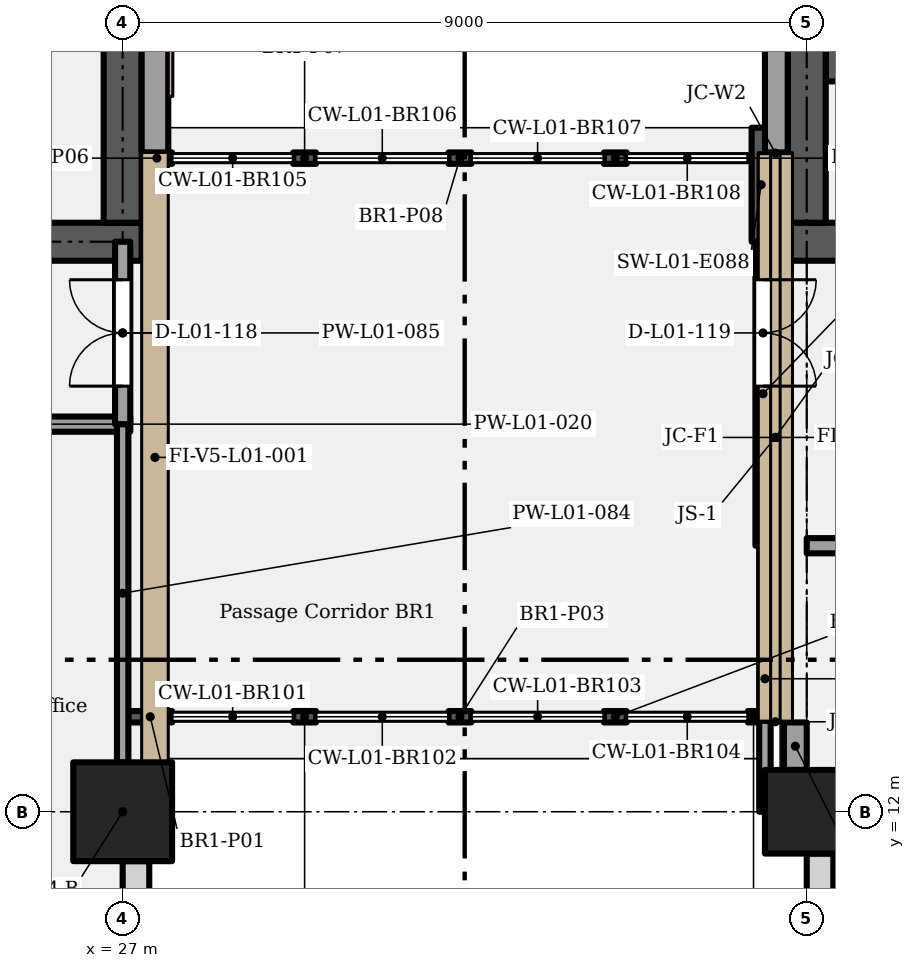
"""IFC4 building model, lengths in metres.
Left out: names, types, materials, properties, quantities, classifications, styles, units other than length and angle.
Written with IfcOpenShell. Run it as: python <this file> out.ifc"""

import sys

from ifc_helpers import new_model, si_unit, direction, frame, frame_2d, origin, origin_2d, place, context, subcontext, project, spatial, rectangle, extrude, element, fill, save


model = new_model("IFC4")
c1 = context("Model", 3, precision=1e-05, world=origin(), true_north=direction((0.0, 1.0)))
c2 = subcontext(c1, "Body", "Model", "MODEL_VIEW")
j1 = project(units=[si_unit("LENGTHUNIT", "METRE"), si_unit("PLANEANGLEUNIT", "RADIAN")], contexts=[c1])
p1 = place(None, origin())
s1 = spatial("IfcSite", under=j1, at=p1, CompositionType="ELEMENT")
p2 = place(p1, origin())
s2 = spatial("IfcBuilding", under=s1, at=p2, CompositionType="ELEMENT")
p3 = place(p2, frame((0.0, 0.0, 6.6)))
s3 = spatial("IfcBuildingStorey", under=s2, at=p3, CompositionType="ELEMENT", Elevation=6.6)
p4 = place(p3, frame((27.0, 12.0, 0.0), z_axis=(0.0, 0.0, 1.0), x_axis=(1.0, 0.0, 0.0)))
e1 = element("IfcColumn", 1, at=p4, inside=s3, PredefinedType="COLUMN", context=c2, shape_type="SweptSolid", body=[
    extrude(rectangle(XDim=1.3, YDim=1.3, at=origin_2d()), origin(), (0.0, 0.0, 1.0), 5.4),
])
p5 = place(p3, frame((36.0, 12.0, 0.0), z_axis=(0.0, 0.0, 1.0), x_axis=(1.0, 0.0, 0.0)))
e2 = element("IfcColumn", 2, at=p5, inside=s3, PredefinedType="COLUMN", context=c2, shape_type="SweptSolid", body=[
    extrude(rectangle(XDim=1.1, YDim=1.1, at=origin_2d()), origin(), (0.0, 0.0, 1.0), 5.4),
])
p6 = place(p3, frame((17.75, 19.5, 0.0), z_axis=(0.0, 0.0, 1.0), x_axis=(1.0, 0.0, 0.0)))
e3 = element("IfcWall", 3, at=p6, inside=s3, PredefinedType="SHEAR", context=c2, shape_type="SweptSolid", body=[
    extrude(rectangle(XDim=9.5, YDim=0.5, at=frame_2d((4.75, 0.0))), origin(), (0.0, 0.0, 1.0), 5.1),
])
p7 = place(p6, frame((1.9, 0.0, 0.0)))
e4 = element("IfcOpeningElement", 4, at=p7, cuts=e3, PredefinedType="OPENING", context=c2, shape_type="SweptSolid", body=[
    extrude(rectangle(XDim=1.2, YDim=2.1, at=frame_2d((0.6, 1.05))), frame((0.0, 0.26, 0.0), z_axis=(0.0, -1.0, 0.0), x_axis=(1.0, 0.0, 0.0)), (0.0, 0.0, 1.0), 0.52),
])
p8 = place(p6, frame((7.95, 0.0, 0.0), z_axis=(0.0, 0.0, 1.0), x_axis=(-1.0, 0.0, 0.0)))
e5 = element("IfcOpeningElement", 5, at=p8, cuts=e3, PredefinedType="OPENING", context=c2, shape_type="SweptSolid", body=[
    extrude(rectangle(XDim=1.8, YDim=2.1, at=frame_2d((0.9, 1.05))), frame((0.0, 0.26, 0.0), z_axis=(0.0, -1.0, 0.0), x_axis=(1.0, 0.0, 0.0)), (0.0, 0.0, 1.0), 0.52),
])
p9 = place(p3, frame((35.75, 19.5, 0.0), z_axis=(0.0, 0.0, 1.0), x_axis=(1.0, 0.0, 0.0)))
e6 = element("IfcWall", 6, at=p9, inside=s3, PredefinedType="SHEAR", context=c2, shape_type="SweptSolid", body=[
    extrude(rectangle(XDim=5.0, YDim=0.5, at=frame_2d((2.5, 0.0))), origin(), (0.0, 0.0, 1.0), 5.1),
])
p10 = place(p9, frame((1.9, 0.0, 0.0)))
e7 = element("IfcOpeningElement", 7, at=p10, cuts=e6, PredefinedType="OPENING", context=c2, shape_type="SweptSolid", body=[
    extrude(rectangle(XDim=1.2, YDim=2.1, at=frame_2d((0.6, 1.05))), frame((0.0, 0.26, 0.0), z_axis=(0.0, -1.0, 0.0), x_axis=(1.0, 0.0, 0.0)), (0.0, 0.0, 1.0), 0.52),
])
p11 = place(p3, frame((27.0, 19.75, 0.0), z_axis=(0.0, 0.0, 1.0), x_axis=(0.0, 1.0, 0.0)))
e8 = element("IfcWall", 8, at=p11, inside=s3, PredefinedType="SHEAR", context=c2, shape_type="SweptSolid", body=[
    extrude(rectangle(XDim=8.1, YDim=0.5, at=frame_2d((4.05, 0.0))), origin(), (0.0, 0.0, 1.0), 5.1),
])
p12 = place(p3, frame((36.0, 19.75, 0.0), z_axis=(0.0, 0.0, 1.0), x_axis=(0.0, 1.0, 0.0)))
e9 = element("IfcWall", 9, at=p12, inside=s3, PredefinedType="SHEAR", context=c2, shape_type="SweptSolid", body=[
    extrude(rectangle(XDim=8.2, YDim=0.5, at=frame_2d((4.1, 0.0))), origin(), (0.0, 0.0, 1.0), 5.1),
])
p13 = place(p3, frame((35.85, 12.55, 0.0), z_axis=(0.0, 0.0, 1.0), x_axis=(0.0, 1.0, 0.0)))
e10 = element("IfcWall", 10, at=p13, inside=s3, PredefinedType="SOLIDWALL", context=c2, shape_type="SweptSolid", body=[
    extrude(rectangle(XDim=0.625, YDim=0.3, at=frame_2d((0.312, 0.0))), origin(), (0.0, 0.0, 1.0), 5.1),
])
p14 = place(p3, frame((35.6, 20.675, 0.0), z_axis=(0.0, 0.0, 1.0), x_axis=(0.0, 1.0, 0.0)))
e11 = element("IfcWall", 11, at=p14, inside=s3, PredefinedType="SOLIDWALL", context=c2, shape_type="SweptSolid", body=[
    extrude(rectangle(XDim=7.275, YDim=0.3, at=frame_2d((3.637, 0.0))), origin(), (0.0, 0.0, 1.0), 5.1),
])
p15 = place(p3, frame((27.175, 0.65, 0.0), z_axis=(0.0, 0.0, 1.0), x_axis=(0.0, 1.0, 0.0)))
e12 = element("IfcWall", 12, at=p15, inside=s3, PredefinedType="SOLIDWALL", context=c2, shape_type="SweptSolid", body=[
    extrude(rectangle(XDim=10.7, YDim=0.35, at=frame_2d((5.35, 0.0))), origin(), (0.0, 0.0, 1.0), 5.1),
])
p16 = place(p3, frame((27.425, 20.675, 0.0), z_axis=(0.0, 0.0, 1.0), x_axis=(0.0, 1.0, 0.0)))
e13 = element("IfcWall", 13, at=p16, inside=s3, PredefinedType="SOLIDWALL", context=c2, shape_type="SweptSolid", body=[
    extrude(rectangle(XDim=7.175, YDim=0.35, at=frame_2d((3.587, 0.0))), origin(), (0.0, 0.0, 1.0), 5.1),
])
p17 = place(p3, frame((36.175, 0.7, 0.0), z_axis=(0.0, 0.0, 1.0), x_axis=(0.0, 1.0, 0.0)))
e14 = element("IfcWall", 14, at=p17, inside=s3, PredefinedType="SOLIDWALL", context=c2, shape_type="SweptSolid", body=[
    extrude(rectangle(XDim=10.75, YDim=0.35, at=frame_2d((5.375, 0.0))), origin(), (0.0, 0.0, 1.0), 5.4),
])
p18 = place(p3, frame((36.0, 15.5, 0.0), z_axis=(0.0, 0.0, 1.0), x_axis=(1.0, 0.0, 0.0)))
e15 = element("IfcWall", 15, at=p18, inside=s3, PredefinedType="PARTITIONING", context=c2, shape_type="SweptSolid", body=[
    extrude(rectangle(XDim=4.562, YDim=0.2, at=frame_2d((2.281, 0.0))), origin(), (0.0, 0.0, 1.0), 5.1),
])
p19 = place(p18, frame((1.75, 0.0, 0.0)))
e16 = element("IfcOpeningElement", 16, at=p19, cuts=e15, PredefinedType="OPENING", context=c2, shape_type="SweptSolid", body=[
    extrude(rectangle(XDim=1.0, YDim=2.4, at=frame_2d((0.5, 1.2))), frame((0.0, 0.11, 0.0), z_axis=(0.0, -1.0, 0.0), x_axis=(1.0, 0.0, 0.0)), (0.0, 0.0, 1.0), 0.22),
])
p20 = place(p3, frame((22.5, 17.1, 0.0), z_axis=(0.0, 0.0, 1.0), x_axis=(1.0, 0.0, 0.0)))
e17 = element("IfcWall", 17, at=p20, inside=s3, PredefinedType="PARTITIONING", context=c2, shape_type="SweptSolid", body=[
    extrude(rectangle(XDim=4.6, YDim=0.2, at=frame_2d((2.3, 0.0))), origin(), (0.0, 0.0, 1.0), 5.1),
])
p21 = place(p20, frame((2.75, 0.0, 0.0), z_axis=(0.0, 0.0, 1.0), x_axis=(-1.0, 0.0, 0.0)))
e18 = element("IfcOpeningElement", 18, at=p21, cuts=e17, PredefinedType="OPENING", context=c2, shape_type="SweptSolid", body=[
    extrude(rectangle(XDim=1.0, YDim=2.1, at=frame_2d((0.5, 1.05))), frame((0.0, 0.11, 0.0), z_axis=(0.0, -1.0, 0.0), x_axis=(1.0, 0.0, 0.0)), (0.0, 0.0, 1.0), 0.22),
])
p22 = place(p3, frame((27.0, 12.65, 0.0), z_axis=(0.0, 0.0, 1.0), x_axis=(0.0, 1.0, 0.0)))
e19 = element("IfcWall", 19, at=p22, inside=s3, PredefinedType="PARTITIONING", context=c2, shape_type="SweptSolid", body=[
    extrude(rectangle(XDim=4.45, YDim=0.15, at=frame_2d((2.225, 0.0))), origin(), (0.0, 0.0, 1.0), 3.3),
])
p23 = place(p3, frame((27.0, 17.1, 0.0), z_axis=(0.0, 0.0, 1.0), x_axis=(0.0, 1.0, 0.0)))
e20 = element("IfcWall", 20, at=p23, inside=s3, PredefinedType="PARTITIONING", context=c2, shape_type="SweptSolid", body=[
    extrude(rectangle(XDim=2.4, YDim=0.2, at=frame_2d((1.2, 0.0))), origin(), (0.0, 0.0, 1.0), 3.3),
])
p24 = place(p23, frame((0.5, 0.0, 0.0)))
e21 = element("IfcOpeningElement", 21, at=p24, cuts=e20, PredefinedType="OPENING", context=c2, shape_type="SweptSolid", body=[
    extrude(rectangle(XDim=1.4, YDim=2.4, at=frame_2d((0.7, 1.2))), frame((0.0, 0.11, 0.0), z_axis=(0.0, -1.0, 0.0), x_axis=(1.0, 0.0, 0.0)), (0.0, 0.0, 1.0), 0.22),
])
p25 = place(p3, frame((35.4, 19.5, 0.0), z_axis=(0.0, 0.0, 1.0), x_axis=(0.0, 1.0, 0.0)))
e22 = element("IfcWall", 22, at=p25, inside=s3, PredefinedType="SHEAR", context=c2, shape_type="SweptSolid", body=[
    extrude(rectangle(XDim=1.5, YDim=0.25, at=frame_2d((0.75, 0.0))), origin(), (0.0, 0.0, 1.0), 3.3),
])
p26 = place(p3, frame((35.425, 15.5, 0.0), z_axis=(0.0, 0.0, 1.0), x_axis=(0.0, 1.0, 0.0)))
e23 = element("IfcWall", 23, at=p26, inside=s3, PredefinedType="PARTITIONING", context=c2, shape_type="SweptSolid", body=[
    extrude(rectangle(XDim=4.0, YDim=0.2, at=frame_2d((2.0, 0.0))), origin(), (0.0, 0.0, 1.0), 3.3),
])
p27 = place(p26, frame((3.5, 0.0, 0.0), z_axis=(0.0, 0.0, 1.0), x_axis=(-1.0, 0.0, 0.0)))
e24 = element("IfcOpeningElement", 24, at=p27, cuts=e23, PredefinedType="OPENING", context=c2, shape_type="SweptSolid", body=[
    extrude(rectangle(XDim=1.4, YDim=2.4, at=frame_2d((0.7, 1.2))), frame((0.0, 0.11, 0.0), z_axis=(0.0, -1.0, 0.0), x_axis=(1.0, 0.0, 0.0)), (0.0, 0.0, 1.0), 0.22),
])
p28 = place(p3, frame((35.45, 12.0, 0.0), z_axis=(0.0, 0.0, 1.0), x_axis=(0.0, 1.0, 0.0)))
e25 = element("IfcWall", 25, at=p28, inside=s3, PredefinedType="PARTITIONING", context=c2, shape_type="SweptSolid", body=[
    extrude(rectangle(XDim=3.5, YDim=0.15, at=frame_2d((1.75, 0.0))), origin(), (0.0, 0.0, 1.0), 3.3),
])
p29 = place(p3, frame((36.425, 21.61, 0.0), z_axis=(0.0, 0.0, 1.0), x_axis=(0.0, 1.0, 0.0)))
e26 = element("IfcWall", 26, at=p29, inside=s3, PredefinedType="SHEAR", context=c2, shape_type="SweptSolid", body=[
    extrude(rectangle(XDim=6.64, YDim=0.35, at=frame_2d((3.32, 0.0))), origin(), (0.0, 0.0, 1.0), 5.1),
])
p30 = place(p3, frame((27.075, 13.25, 0.0), z_axis=(0.0, 0.0, 1.0), x_axis=(1.0, 0.0, 0.0)))
e27 = element("IfcWall", 27, at=p30, inside=s3, PredefinedType="SOLIDWALL", context=c2, shape_type="SweptSolid", body=[
    extrude(rectangle(XDim=0.575, YDim=0.15, at=frame_2d((0.288, 0.0))), origin(), (0.0, 0.0, 1.0), 3.3),
])
for number, where, z_axis, x_axis in (
    (28, (29.244, 13.25, 0.0), (0.0, 0.0, 1.0), (1.0, 0.0, 0.0)),
    (29, (31.288, 13.25, 0.0), (0.0, 0.0, 1.0), (1.0, 0.0, 0.0)),
):
    element("IfcWall", number, at=place(p3, frame(where, z_axis=z_axis, x_axis=x_axis)), inside=s3, PredefinedType="SOLIDWALL", context=c2, shape_type="SweptSolid", body=[
        extrude(rectangle(XDim=0.3, YDim=0.15, at=frame_2d((0.15, 0.0))), origin(), (0.0, 0.0, 1.0), 3.3),
    ])
p31 = place(p3, frame((33.331, 13.25, 0.0), z_axis=(0.0, 0.0, 1.0), x_axis=(1.0, 0.0, 0.0)))
e30 = element("IfcWall", 30, at=p31, inside=s3, PredefinedType="SOLIDWALL", context=c2, shape_type="SweptSolid", body=[
    extrude(rectangle(XDim=0.3, YDim=0.15, at=frame_2d((0.15, 0.0))), origin(), (0.0, 0.0, 1.0), 3.3),
])
p32 = place(p3, frame((35.225, 13.25, 0.0), z_axis=(0.0, 0.0, 1.0), x_axis=(1.0, 0.0, 0.0)))
e31 = element("IfcWall", 31, at=p32, inside=s3, PredefinedType="SOLIDWALL", context=c2, shape_type="SweptSolid", body=[
    extrude(rectangle(XDim=0.15, YDim=0.15, at=frame_2d((0.075, 0.0))), origin(), (0.0, 0.0, 1.0), 3.3),
])
p33 = place(p3, frame((27.25, 20.6, 0.0), z_axis=(0.0, 0.0, 1.0), x_axis=(1.0, 0.0, 0.0)))
e32 = element("IfcWall", 32, at=p33, inside=s3, PredefinedType="SOLIDWALL", context=c2, shape_type="SweptSolid", body=[
    extrude(rectangle(XDim=0.4, YDim=0.15, at=frame_2d((0.2, 0.0))), origin(), (0.0, 0.0, 1.0), 3.3),
])
for number, where, z_axis, x_axis in (
    (33, (29.244, 20.6, 0.0), (0.0, 0.0, 1.0), (1.0, 0.0, 0.0)),
    (34, (31.288, 20.6, 0.0), (0.0, 0.0, 1.0), (1.0, 0.0, 0.0)),
):
    element("IfcWall", number, at=place(p3, frame(where, z_axis=z_axis, x_axis=x_axis)), inside=s3, PredefinedType="SOLIDWALL", context=c2, shape_type="SweptSolid", body=[
        extrude(rectangle(XDim=0.3, YDim=0.15, at=frame_2d((0.15, 0.0))), origin(), (0.0, 0.0, 1.0), 3.3),
    ])
p34 = place(p3, frame((33.331, 20.6, 0.0), z_axis=(0.0, 0.0, 1.0), x_axis=(1.0, 0.0, 0.0)))
e35 = element("IfcWall", 35, at=p34, inside=s3, PredefinedType="SOLIDWALL", context=c2, shape_type="SweptSolid", body=[
    extrude(rectangle(XDim=0.3, YDim=0.15, at=frame_2d((0.15, 0.0))), origin(), (0.0, 0.0, 1.0), 3.3),
])
p35 = place(p24, origin())
e36 = element("IfcDoor", 36, at=p35, inside=s3, OperationType="DOUBLE_DOOR_SINGLE_SWING", PredefinedType="DOOR", context=c2, shape_type="SweptSolid", body=[
    extrude(rectangle(XDim=1.4, YDim=2.4, at=frame_2d((0.7, 1.2))), frame((0.0, 0.025, 0.0), z_axis=(0.0, -1.0, 0.0), x_axis=(1.0, 0.0, 0.0)), (0.0, 0.0, 1.0), 0.05),
])
fill(e21, e36)
p36 = place(p27, origin())
e37 = element("IfcDoor", 37, at=p36, inside=s3, OperationType="DOUBLE_DOOR_SINGLE_SWING", PredefinedType="DOOR", context=c2, shape_type="SweptSolid", body=[
    extrude(rectangle(XDim=1.4, YDim=2.4, at=frame_2d((0.7, 1.2))), frame((0.0, 0.025, 0.0), z_axis=(0.0, -1.0, 0.0), x_axis=(1.0, 0.0, 0.0)), (0.0, 0.0, 1.0), 0.05),
])
fill(e24, e37)
save(model, sys.argv[1])
